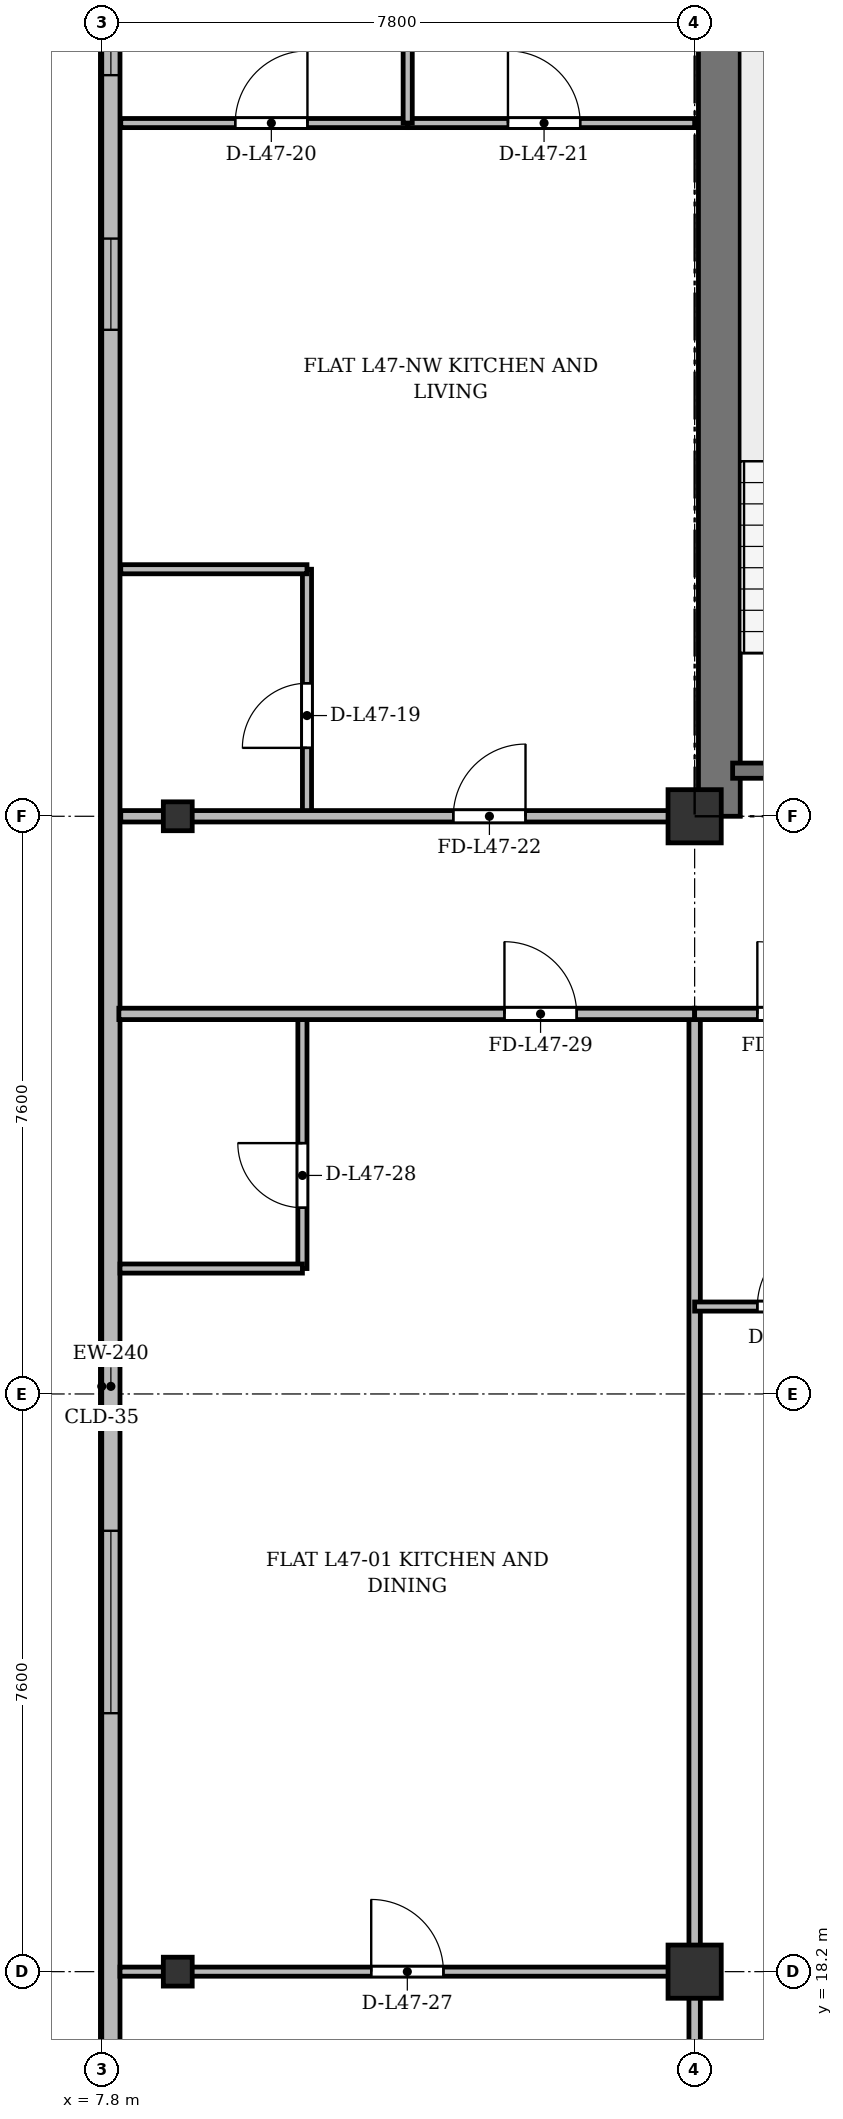
"""IFC4 building model, lengths in metres.
Left out: names, types, materials, properties, quantities, classifications, styles, units other than length and angle.
Written with IfcOpenShell. Run it as: python <this file> out.ifc"""

import sys

from ifc_helpers import new_model, si_unit, direction, frame, frame_2d, origin, origin_2d, place, context, subcontext, project, spatial, rectangle, i_section, extrude, source, transform, mapped, element, fill, save


model = new_model("IFC4")
c1 = context("Model", 3, precision=1e-05, world=origin(), true_north=direction((0.0, 1.0)))
c2 = subcontext(c1, "Body", "Model", "MODEL_VIEW")
j1 = project(units=[si_unit("LENGTHUNIT", "METRE"), si_unit("PLANEANGLEUNIT", "RADIAN")], contexts=[c1])
p1 = place(None, origin())
s1 = spatial("IfcSite", under=j1, at=p1, CompositionType="ELEMENT")
p2 = place(p1, origin())
s2 = spatial("IfcBuilding", under=s1, at=p2, CompositionType="ELEMENT")
p3 = place(p2, frame((0.0, 0.0, 178.9)))
s3 = spatial("IfcBuildingStorey", under=s2, at=p3, CompositionType="ELEMENT", Elevation=178.9)
m1 = source(origin(), c2, "Body", "SweptSolid", [
    extrude(i_section(OverallWidth=0.38, OverallDepth=0.38, WebThickness=0.02, FlangeThickness=0.03, at=origin_2d()), origin(), (0.0, 0.0, 1.0), 3.6),
])
for number, where, z_axis, x_axis in (
    (1, (8.8, 18.2, 0.0), (0.0, 0.0, 1.0), (1.0, 0.0, 0.0)),
    (2, (8.8, 33.4, 0.0), (0.0, 0.0, 1.0), (1.0, 0.0, 0.0)),
):
    element("IfcColumn", number, at=place(p3, frame(where, z_axis=z_axis, x_axis=x_axis)), inside=s3, PredefinedType="COLUMN", context=c2, shape_type="MappedRepresentation", body=[
        mapped(m1, transform((0.0, 0.0, 0.0), x_axis=(1.0, 0.0, 0.0), y_axis=(0.0, 1.0, 0.0), z_axis=(0.0, 0.0, 1.0), scale=1.0)),
    ])
m2 = source(origin(), c2, "Body", "SweptSolid", [
    extrude(rectangle(XDim=0.7, YDim=0.7, at=origin_2d()), origin(), (0.0, 0.0, 1.0), 3.6),
])
for number, where, z_axis, x_axis in (
    (3, (15.6, 18.2, 0.0), (0.0, 0.0, 1.0), (1.0, 0.0, 0.0)),
    (4, (15.6, 33.4, 0.0), (0.0, 0.0, 1.0), (1.0, 0.0, 0.0)),
):
    element("IfcColumn", number, at=place(p3, frame(where, z_axis=z_axis, x_axis=x_axis)), inside=s3, PredefinedType="COLUMN", context=c2, shape_type="MappedRepresentation", body=[
        mapped(m2, transform((0.0, 0.0, 0.0), x_axis=(1.0, 0.0, 0.0), y_axis=(0.0, 1.0, 0.0), z_axis=(0.0, 0.0, 1.0), scale=1.0)),
    ])
p4 = place(p3, frame((7.92, 6.3, 0.0), z_axis=(0.0, 0.0, 1.0), x_axis=(0.0, 1.0, 0.0)))
e5 = element("IfcWall", 5, at=p4, inside=s3, PredefinedType="SOLIDWALL", context=c2, shape_type="SweptSolid", body=[
    extrude(rectangle(XDim=39.2, YDim=0.24, at=frame_2d((19.6, 0.0))), origin(), (0.0, 0.0, 1.0), 3.22),
])
p5 = place(p4, frame((1.45, 0.0, 0.92)))
e6 = element("IfcOpeningElement", 6, at=p5, cuts=e5, PredefinedType="OPENING", context=c2, shape_type="SweptSolid", body=[
    extrude(rectangle(XDim=1.2, YDim=1.65, at=frame_2d((0.6, 0.825))), frame((0.0, 0.13, 0.0), z_axis=(0.0, -1.0, 0.0), x_axis=(1.0, 0.0, 0.0)), (0.0, 0.0, 1.0), 0.26),
])
p6 = place(p4, frame((3.9, 0.0, 0.92)))
e7 = element("IfcOpeningElement", 7, at=p6, cuts=e5, PredefinedType="OPENING", context=c2, shape_type="SweptSolid", body=[
    extrude(rectangle(XDim=2.4, YDim=2.1, at=frame_2d((1.2, 1.05))), frame((0.0, 0.13, 0.0), z_axis=(0.0, -1.0, 0.0), x_axis=(1.0, 0.0, 0.0)), (0.0, 0.0, 1.0), 0.26),
])
p7 = place(p4, frame((8.1, 0.0, 0.92)))
e8 = element("IfcOpeningElement", 8, at=p7, cuts=e5, PredefinedType="OPENING", context=c2, shape_type="SweptSolid", body=[
    extrude(rectangle(XDim=2.4, YDim=2.1, at=frame_2d((1.2, 1.05))), frame((0.0, 0.13, 0.0), z_axis=(0.0, -1.0, 0.0), x_axis=(1.0, 0.0, 0.0)), (0.0, 0.0, 1.0), 0.26),
])
p8 = place(p4, frame((15.3, 0.0, 0.92)))
e9 = element("IfcOpeningElement", 9, at=p8, cuts=e5, PredefinedType="OPENING", context=c2, shape_type="SweptSolid", body=[
    extrude(rectangle(XDim=2.4, YDim=2.1, at=frame_2d((1.2, 1.05))), frame((0.0, 0.13, 0.0), z_axis=(0.0, -1.0, 0.0), x_axis=(1.0, 0.0, 0.0)), (0.0, 0.0, 1.0), 0.26),
])
p9 = place(p4, frame((33.5, 0.0, 0.92)))
e10 = element("IfcOpeningElement", 10, at=p9, cuts=e5, PredefinedType="OPENING", context=c2, shape_type="SweptSolid", body=[
    extrude(rectangle(XDim=1.2, YDim=1.65, at=frame_2d((0.6, 0.825))), frame((0.0, 0.13, 0.0), z_axis=(0.0, -1.0, 0.0), x_axis=(1.0, 0.0, 0.0)), (0.0, 0.0, 1.0), 0.26),
])
p10 = place(p4, frame((36.85, 0.0, 0.92)))
e11 = element("IfcOpeningElement", 11, at=p10, cuts=e5, PredefinedType="OPENING", context=c2, shape_type="SweptSolid", body=[
    extrude(rectangle(XDim=1.2, YDim=1.65, at=frame_2d((0.6, 0.825))), frame((0.0, 0.13, 0.0), z_axis=(0.0, -1.0, 0.0), x_axis=(1.0, 0.0, 0.0)), (0.0, 0.0, 1.0), 0.26),
])
p11 = place(p3, frame((15.925, 33.4, 0.0), z_axis=(0.0, 0.0, 1.0), x_axis=(0.0, 1.0, 0.0)))
e12 = element("IfcWall", 12, at=p11, inside=s3, PredefinedType="SHEAR", context=c2, shape_type="SweptSolid", body=[
    extrude(rectangle(XDim=11.55, YDim=0.55, at=frame_2d((5.775, 0.0))), origin(), (0.0, 0.0, 1.0), 3.22),
])
p12 = place(p3, frame((16.1, 34.0, 0.0), z_axis=(0.0, 0.0, 1.0), x_axis=(1.0, 0.0, 0.0)))
e13 = element("IfcWall", 13, at=p12, inside=s3, PredefinedType="SHEAR", context=c2, shape_type="SweptSolid", body=[
    extrude(rectangle(XDim=3.4, YDim=0.2, at=frame_2d((1.7, 0.0))), origin(), (0.0, 0.0, 1.0), 3.22),
])
p13 = place(p3, frame((10.5, 33.4, 0.0), z_axis=(0.0, 0.0, 1.0), x_axis=(0.0, 1.0, 0.0)))
e14 = element("IfcWall", 14, at=p13, inside=s3, PredefinedType="PARTITIONING", context=c2, shape_type="SweptSolid", body=[
    extrude(rectangle(XDim=3.25, YDim=0.12, at=frame_2d((1.625, 0.0))), origin(), (0.0, 0.0, 1.0), 2.62),
])
p14 = place(p13, frame((0.9, 0.0, 0.0)))
e15 = element("IfcOpeningElement", 15, at=p14, cuts=e14, PredefinedType="OPENING", context=c2, shape_type="SweptSolid", body=[
    extrude(rectangle(XDim=0.85, YDim=2.1, at=frame_2d((0.425, 1.05))), frame((0.0, 0.07, 0.0), z_axis=(0.0, -1.0, 0.0), x_axis=(1.0, 0.0, 0.0)), (0.0, 0.0, 1.0), 0.14),
])
p15 = place(p3, frame((8.05, 36.65, 0.0), z_axis=(0.0, 0.0, 1.0), x_axis=(1.0, 0.0, 0.0)))
e16 = element("IfcWall", 16, at=p15, inside=s3, PredefinedType="PARTITIONING", context=c2, shape_type="SweptSolid", body=[
    extrude(rectangle(XDim=2.45, YDim=0.12, at=frame_2d((1.225, 0.0))), origin(), (0.0, 0.0, 1.0), 2.72),
])
p16 = place(p3, frame((8.05, 42.52, 0.0), z_axis=(0.0, 0.0, 1.0), x_axis=(1.0, 0.0, 0.0)))
e17 = element("IfcWall", 17, at=p16, inside=s3, PredefinedType="PARTITIONING", context=c2, shape_type="SweptSolid", body=[
    extrude(rectangle(XDim=3.775, YDim=0.12, at=frame_2d((1.887, 0.0))), origin(), (0.0, 0.0, 1.0), 2.72),
])
p17 = place(p16, frame((1.506, 0.0, 0.0)))
e18 = element("IfcOpeningElement", 18, at=p17, cuts=e17, PredefinedType="OPENING", context=c2, shape_type="SweptSolid", body=[
    extrude(rectangle(XDim=0.95, YDim=2.15, at=frame_2d((0.475, 1.075))), frame((0.0, 0.07, 0.0), z_axis=(0.0, -1.0, 0.0), x_axis=(1.0, 0.0, 0.0)), (0.0, 0.0, 1.0), 0.14),
])
p18 = place(p3, frame((11.825, 42.52, 0.0), z_axis=(0.0, 0.0, 1.0), x_axis=(1.0, 0.0, 0.0)))
e19 = element("IfcWall", 19, at=p18, inside=s3, PredefinedType="PARTITIONING", context=c2, shape_type="SweptSolid", body=[
    extrude(rectangle(XDim=3.775, YDim=0.12, at=frame_2d((1.888, 0.0))), origin(), (0.0, 0.0, 1.0), 2.72),
])
p19 = place(p18, frame((1.319, 0.0, 0.0)))
e20 = element("IfcOpeningElement", 20, at=p19, cuts=e19, PredefinedType="OPENING", context=c2, shape_type="SweptSolid", body=[
    extrude(rectangle(XDim=0.95, YDim=2.15, at=frame_2d((0.475, 1.075))), frame((0.0, 0.07, 0.0), z_axis=(0.0, -1.0, 0.0), x_axis=(1.0, 0.0, 0.0)), (0.0, 0.0, 1.0), 0.14),
])
p20 = place(p3, frame((11.825, 42.52, 0.0), z_axis=(0.0, 0.0, 1.0), x_axis=(0.0, 1.0, 0.0)))
e21 = element("IfcWall", 21, at=p20, inside=s3, PredefinedType="PARTITIONING", context=c2, shape_type="SweptSolid", body=[
    extrude(rectangle(XDim=5.74, YDim=0.12, at=frame_2d((2.87, 0.0))), origin(), (0.0, 0.0, 1.0), 2.62),
])
p21 = place(p3, frame((8.05, 33.4, 0.0), z_axis=(0.0, 0.0, 1.0), x_axis=(1.0, 0.0, 0.0)))
e22 = element("IfcWall", 22, at=p21, inside=s3, PredefinedType="PARTITIONING", context=c2, shape_type="SweptSolid", body=[
    extrude(rectangle(XDim=7.55, YDim=0.15, at=frame_2d((3.775, 0.0))), origin(), (0.0, 0.0, 1.0), 2.62),
])
p22 = place(p21, frame((4.375, 0.0, 0.0)))
e23 = element("IfcOpeningElement", 23, at=p22, cuts=e22, PredefinedType="OPENING", context=c2, shape_type="SweptSolid", body=[
    extrude(rectangle(XDim=0.95, YDim=2.15, at=frame_2d((0.475, 1.075))), frame((0.0, 0.085, 0.0), z_axis=(0.0, -1.0, 0.0), x_axis=(1.0, 0.0, 0.0)), (0.0, 0.0, 1.0), 0.17),
])
p23 = place(p3, frame((15.6, 3.525, 0.0), z_axis=(0.0, 0.0, 1.0), x_axis=(0.0, 1.0, 0.0)))
e24 = element("IfcWall", 24, at=p23, inside=s3, PredefinedType="PARTITIONING", context=c2, shape_type="SweptSolid", body=[
    extrude(rectangle(XDim=27.275, YDim=0.15, at=frame_2d((13.638, 0.0))), origin(), (0.0, 0.0, 1.0), 2.72),
])
p24 = place(p3, frame((8.04, 18.2, 0.0), z_axis=(0.0, 0.0, 1.0), x_axis=(1.0, 0.0, 0.0)))
e25 = element("IfcWall", 25, at=p24, inside=s3, PredefinedType="PARTITIONING", context=c2, shape_type="SweptSolid", body=[
    extrude(rectangle(XDim=7.56, YDim=0.12, at=frame_2d((3.78, 0.0))), origin(), (0.0, 0.0, 1.0), 2.62),
])
p25 = place(p24, frame((3.305, 0.0, 0.0)))
e26 = element("IfcOpeningElement", 26, at=p25, cuts=e25, PredefinedType="OPENING", context=c2, shape_type="SweptSolid", body=[
    extrude(rectangle(XDim=0.95, YDim=2.15, at=frame_2d((0.475, 1.075))), frame((0.0, 0.07, 0.0), z_axis=(0.0, -1.0, 0.0), x_axis=(1.0, 0.0, 0.0)), (0.0, 0.0, 1.0), 0.14),
])
p26 = place(p3, frame((10.44, 27.45, 0.0), z_axis=(0.0, 0.0, 1.0), x_axis=(0.0, 1.0, 0.0)))
e27 = element("IfcWall", 27, at=p26, inside=s3, PredefinedType="PARTITIONING", context=c2, shape_type="SweptSolid", body=[
    extrude(rectangle(XDim=3.35, YDim=0.12, at=frame_2d((1.675, 0.0))), origin(), (0.0, 0.0, 1.0), 3.22),
])
p27 = place(p26, frame((0.8, 0.0, 0.0)))
e28 = element("IfcOpeningElement", 28, at=p27, cuts=e27, PredefinedType="OPENING", context=c2, shape_type="SweptSolid", body=[
    extrude(rectangle(XDim=0.85, YDim=2.1, at=frame_2d((0.425, 1.05))), frame((0.0, 0.07, 0.0), z_axis=(0.0, -1.0, 0.0), x_axis=(1.0, 0.0, 0.0)), (0.0, 0.0, 1.0), 0.14),
])
p28 = place(p3, frame((8.04, 27.45, 0.0), z_axis=(0.0, 0.0, 1.0), x_axis=(1.0, 0.0, 0.0)))
e29 = element("IfcWall", 29, at=p28, inside=s3, PredefinedType="PARTITIONING", context=c2, shape_type="SweptSolid", body=[
    extrude(rectangle(XDim=2.4, YDim=0.12, at=frame_2d((1.2, 0.0))), origin(), (0.0, 0.0, 1.0), 2.72),
])
p29 = place(p3, frame((8.025, 30.8, 0.0), z_axis=(0.0, 0.0, 1.0), x_axis=(1.0, 0.0, 0.0)))
e30 = element("IfcWall", 30, at=p29, inside=s3, PredefinedType="PARTITIONING", context=c2, shape_type="SweptSolid", body=[
    extrude(rectangle(XDim=7.575, YDim=0.15, at=frame_2d((3.788, 0.0))), origin(), (0.0, 0.0, 1.0), 2.72),
])
p30 = place(p29, frame((5.073, 0.0, 0.0)))
e31 = element("IfcOpeningElement", 31, at=p30, cuts=e30, PredefinedType="OPENING", context=c2, shape_type="SweptSolid", body=[
    extrude(rectangle(XDim=0.95, YDim=2.15, at=frame_2d((0.475, 1.075))), frame((0.0, 0.085, 0.0), z_axis=(0.0, -1.0, 0.0), x_axis=(1.0, 0.0, 0.0)), (0.0, 0.0, 1.0), 0.17),
])
p31 = place(p3, frame((15.6, 30.8, 0.0), z_axis=(0.0, 0.0, 1.0), x_axis=(1.0, 0.0, 0.0)))
e32 = element("IfcWall", 32, at=p31, inside=s3, PredefinedType="PARTITIONING", context=c2, shape_type="SweptSolid", body=[
    extrude(rectangle(XDim=2.6, YDim=0.15, at=frame_2d((1.3, 0.0))), origin(), (0.0, 0.0, 1.0), 2.72),
])
p32 = place(p31, frame((0.825, 0.0, 0.0)))
e33 = element("IfcOpeningElement", 33, at=p32, cuts=e32, PredefinedType="OPENING", context=c2, shape_type="SweptSolid", body=[
    extrude(rectangle(XDim=0.95, YDim=2.15, at=frame_2d((0.475, 1.075))), frame((0.0, 0.085, 0.0), z_axis=(0.0, -1.0, 0.0), x_axis=(1.0, 0.0, 0.0)), (0.0, 0.0, 1.0), 0.17),
])
p33 = place(p3, frame((15.6, 26.95, 0.0), z_axis=(0.0, 0.0, 1.0), x_axis=(1.0, 0.0, 0.0)))
e34 = element("IfcWall", 34, at=p33, inside=s3, PredefinedType="PARTITIONING", context=c2, shape_type="SweptSolid", body=[
    extrude(rectangle(XDim=2.6, YDim=0.12, at=frame_2d((1.3, 0.0))), origin(), (0.0, 0.0, 1.0), 2.72),
])
p34 = place(p33, frame((0.825, 0.0, 0.0)))
e35 = element("IfcOpeningElement", 35, at=p34, cuts=e34, PredefinedType="OPENING", context=c2, shape_type="SweptSolid", body=[
    extrude(rectangle(XDim=0.95, YDim=2.15, at=frame_2d((0.475, 1.075))), frame((0.0, 0.07, 0.0), z_axis=(0.0, -1.0, 0.0), x_axis=(1.0, 0.0, 0.0)), (0.0, 0.0, 1.0), 0.14),
])
m3 = source(origin(), c2, "Body", "SweptSolid", [
    extrude(rectangle(XDim=2.4, YDim=2.1, at=frame_2d((1.2, 1.05))), frame((0.0, 0.03, 0.0), z_axis=(0.0, -1.0, 0.0), x_axis=(1.0, 0.0, 0.0)), (0.0, 0.0, 1.0), 0.06),
])
p35 = place(p8, origin())
e36 = element("IfcWindow", 36, at=p35, inside=s3, PartitioningType="SINGLE_PANEL", PredefinedType="WINDOW", context=c2, shape_type="MappedRepresentation", body=[
    mapped(m3, transform((0.0, 0.0, 0.0), x_axis=(1.0, 0.0, 0.0), y_axis=(0.0, 1.0, 0.0), z_axis=(0.0, 0.0, 1.0), scale=1.0)),
])
fill(e9, e36)
m4 = source(origin(), c2, "Body", "SweptSolid", [
    extrude(rectangle(XDim=1.2, YDim=1.65, at=frame_2d((0.6, 0.825))), frame((0.0, 0.03, 0.0), z_axis=(0.0, -1.0, 0.0), x_axis=(1.0, 0.0, 0.0)), (0.0, 0.0, 1.0), 0.06),
])
p36 = place(p9, origin())
e37 = element("IfcWindow", 37, at=p36, inside=s3, PartitioningType="SINGLE_PANEL", PredefinedType="WINDOW", context=c2, shape_type="MappedRepresentation", body=[
    mapped(m4, transform((0.0, 0.0, 0.0), x_axis=(1.0, 0.0, 0.0), y_axis=(0.0, 1.0, 0.0), z_axis=(0.0, 0.0, 1.0), scale=1.0)),
])
fill(e10, e37)
p37 = place(p10, origin())
e38 = element("IfcWindow", 38, at=p37, inside=s3, PartitioningType="SINGLE_PANEL", PredefinedType="WINDOW", context=c2, shape_type="MappedRepresentation", body=[
    mapped(m4, transform((0.0, 0.0, 0.0), x_axis=(1.0, 0.0, 0.0), y_axis=(0.0, 1.0, 0.0), z_axis=(0.0, 0.0, 1.0), scale=1.0)),
])
fill(e11, e38)
m5 = source(origin(), c2, "Body", "SweptSolid", [
    extrude(rectangle(XDim=0.85, YDim=2.1, at=frame_2d((0.425, 1.05))), frame((0.0, 0.025, 0.0), z_axis=(0.0, -1.0, 0.0), x_axis=(1.0, 0.0, 0.0)), (0.0, 0.0, 1.0), 0.05),
])
p38 = place(p14, origin())
e39 = element("IfcDoor", 39, at=p38, inside=s3, OperationType="SINGLE_SWING_LEFT", PredefinedType="DOOR", context=c2, shape_type="MappedRepresentation", body=[
    mapped(m5, transform((0.0, 0.0, 0.0), x_axis=(1.0, 0.0, 0.0), y_axis=(0.0, 1.0, 0.0), z_axis=(0.0, 0.0, 1.0), scale=1.0)),
])
fill(e15, e39)
m6 = source(origin(), c2, "Body", "SweptSolid", [
    extrude(rectangle(XDim=0.95, YDim=2.15, at=frame_2d((0.475, 1.075))), frame((0.0, 0.025, 0.0), z_axis=(0.0, -1.0, 0.0), x_axis=(1.0, 0.0, 0.0)), (0.0, 0.0, 1.0), 0.05),
])
p39 = place(p17, origin())
e40 = element("IfcDoor", 40, at=p39, inside=s3, OperationType="SINGLE_SWING_RIGHT", PredefinedType="DOOR", context=c2, shape_type="MappedRepresentation", body=[
    mapped(m6, transform((0.0, 0.0, 0.0), x_axis=(1.0, 0.0, 0.0), y_axis=(0.0, 1.0, 0.0), z_axis=(0.0, 0.0, 1.0), scale=1.0)),
])
fill(e18, e40)
p40 = place(p19, origin())
e41 = element("IfcDoor", 41, at=p40, inside=s3, OperationType="SINGLE_SWING_LEFT", PredefinedType="DOOR", context=c2, shape_type="MappedRepresentation", body=[
    mapped(m6, transform((0.0, 0.0, 0.0), x_axis=(1.0, 0.0, 0.0), y_axis=(0.0, 1.0, 0.0), z_axis=(0.0, 0.0, 1.0), scale=1.0)),
])
fill(e20, e41)
p41 = place(p22, origin())
e42 = element("IfcDoor", 42, at=p41, inside=s3, OperationType="SINGLE_SWING_RIGHT", PredefinedType="DOOR", context=c2, shape_type="MappedRepresentation", body=[
    mapped(m6, transform((0.0, 0.0, 0.0), x_axis=(1.0, 0.0, 0.0), y_axis=(0.0, 1.0, 0.0), z_axis=(0.0, 0.0, 1.0), scale=1.0)),
])
fill(e23, e42)
p42 = place(p25, origin())
e43 = element("IfcDoor", 43, at=p42, inside=s3, OperationType="SINGLE_SWING_LEFT", PredefinedType="DOOR", context=c2, shape_type="MappedRepresentation", body=[
    mapped(m6, transform((0.0, 0.0, 0.0), x_axis=(1.0, 0.0, 0.0), y_axis=(0.0, 1.0, 0.0), z_axis=(0.0, 0.0, 1.0), scale=1.0)),
])
fill(e26, e43)
p43 = place(p27, origin())
e44 = element("IfcDoor", 44, at=p43, inside=s3, OperationType="SINGLE_SWING_RIGHT", PredefinedType="DOOR", context=c2, shape_type="MappedRepresentation", body=[
    mapped(m5, transform((0.0, 0.0, 0.0), x_axis=(1.0, 0.0, 0.0), y_axis=(0.0, 1.0, 0.0), z_axis=(0.0, 0.0, 1.0), scale=1.0)),
])
fill(e28, e44)
p44 = place(p30, origin())
e45 = element("IfcDoor", 45, at=p44, inside=s3, OperationType="SINGLE_SWING_LEFT", PredefinedType="DOOR", context=c2, shape_type="MappedRepresentation", body=[
    mapped(m6, transform((0.0, 0.0, 0.0), x_axis=(1.0, 0.0, 0.0), y_axis=(0.0, 1.0, 0.0), z_axis=(0.0, 0.0, 1.0), scale=1.0)),
])
fill(e31, e45)
p45 = place(p32, origin())
e46 = element("IfcDoor", 46, at=p45, inside=s3, OperationType="SINGLE_SWING_LEFT", PredefinedType="DOOR", context=c2, shape_type="MappedRepresentation", body=[
    mapped(m6, transform((0.0, 0.0, 0.0), x_axis=(1.0, 0.0, 0.0), y_axis=(0.0, 1.0, 0.0), z_axis=(0.0, 0.0, 1.0), scale=1.0)),
])
fill(e33, e46)
p46 = place(p34, origin())
e47 = element("IfcDoor", 47, at=p46, inside=s3, OperationType="SINGLE_SWING_RIGHT", PredefinedType="DOOR", context=c2, shape_type="MappedRepresentation", body=[
    mapped(m6, transform((0.0, 0.0, 0.0), x_axis=(1.0, 0.0, 0.0), y_axis=(0.0, 1.0, 0.0), z_axis=(0.0, 0.0, 1.0), scale=1.0)),
])
fill(e35, e47)
save(model, sys.argv[1])
